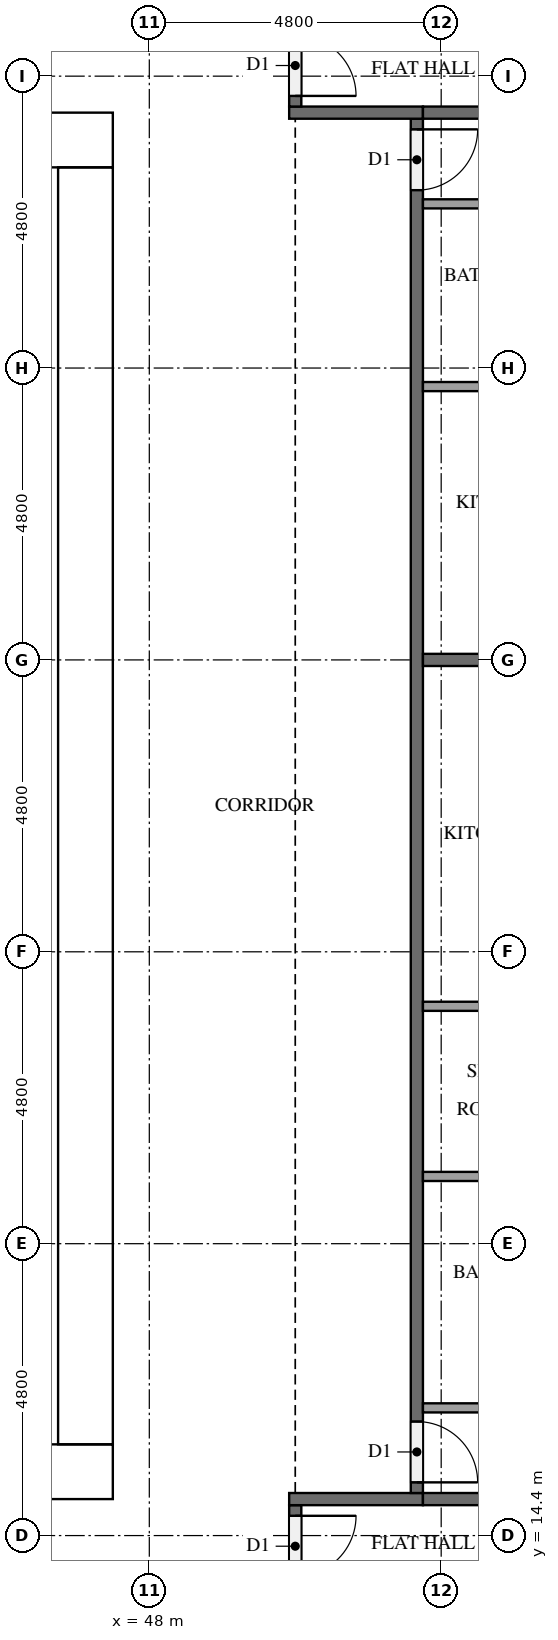
"""IFC4 building model, lengths in metres.
Left out: names, types, materials, properties, quantities, classifications, styles, units other than length and angle.
Written with IfcOpenShell. Run it as: python <this file> out.ifc"""

import sys

from ifc_helpers import new_model, si_unit, direction, frame, frame_2d, origin, place, context, subcontext, project, spatial, rectangle, extrude, element, fill, save


model = new_model("IFC4")
c1 = context("Model", 3, precision=1e-05, world=origin(), true_north=direction((0.0, 1.0)))
c2 = subcontext(c1, "Body", "Model", "MODEL_VIEW")
j1 = project(units=[si_unit("LENGTHUNIT", "METRE"), si_unit("PLANEANGLEUNIT", "RADIAN")], contexts=[c1])
p1 = place(None, origin())
s1 = spatial("IfcSite", under=j1, at=p1, CompositionType="ELEMENT")
p2 = place(p1, origin())
s2 = spatial("IfcBuilding", under=s1, at=p2, CompositionType="ELEMENT")
p3 = place(p2, frame((0.0, 0.0, 92.7)))
s3 = spatial("IfcBuildingStorey", under=s2, at=p3, CompositionType="ELEMENT", Elevation=92.7)
p4 = place(p3, frame((15.0, 15.45, 0.0), z_axis=(0.0, 0.0, 1.0), x_axis=(1.0, 0.0, 0.0)))
e1 = element("IfcWall", 1, at=p4, inside=s3, PredefinedType="SHEAR", context=c2, shape_type="SweptSolid", body=[
    extrude(rectangle(XDim=32.4, YDim=0.9, at=frame_2d((16.2, 0.0))), origin(), (0.0, 0.0, 1.0), 3.2),
])
p5 = place(p4, frame((15.3, 0.0, 0.0)))
e2 = element("IfcOpeningElement", 2, at=p5, cuts=e1, PredefinedType="OPENING", context=c2, shape_type="SweptSolid", body=[
    extrude(rectangle(XDim=1.8, YDim=2.1, at=frame_2d((0.9, 1.05))), frame((0.0, 0.46, 0.0), z_axis=(0.0, -1.0, 0.0), x_axis=(1.0, 0.0, 0.0)), (0.0, 0.0, 1.0), 0.92),
])
p6 = place(p3, frame((15.0, 37.35, 0.0), z_axis=(0.0, 0.0, 1.0), x_axis=(1.0, 0.0, 0.0)))
e3 = element("IfcWall", 3, at=p6, inside=s3, PredefinedType="SHEAR", context=c2, shape_type="SweptSolid", body=[
    extrude(rectangle(XDim=32.4, YDim=0.9, at=frame_2d((16.2, 0.0))), origin(), (0.0, 0.0, 1.0), 3.2),
])
p7 = place(p6, frame((15.3, 0.0, 0.0)))
e4 = element("IfcOpeningElement", 4, at=p7, cuts=e3, PredefinedType="OPENING", context=c2, shape_type="SweptSolid", body=[
    extrude(rectangle(XDim=1.8, YDim=2.1, at=frame_2d((0.9, 1.05))), frame((0.0, 0.46, 0.0), z_axis=(0.0, -1.0, 0.0), x_axis=(1.0, 0.0, 0.0)), (0.0, 0.0, 1.0), 0.92),
])
p8 = place(p6, frame((1.794, 0.0, 0.0)))
e5 = element("IfcOpeningElement", 5, at=p8, cuts=e3, PredefinedType="OPENING", context=c2, shape_type="SweptSolid", body=[
    extrude(rectangle(XDim=1.0, YDim=2.1, at=frame_2d((0.5, 1.05))), frame((0.0, 0.46, 0.0), z_axis=(0.0, -1.0, 0.0), x_axis=(1.0, 0.0, 0.0)), (0.0, 0.0, 1.0), 0.92),
])
p9 = place(p6, frame((5.331, 0.0, 0.0)))
e6 = element("IfcOpeningElement", 6, at=p9, cuts=e3, PredefinedType="OPENING", context=c2, shape_type="SweptSolid", body=[
    extrude(rectangle(XDim=1.0, YDim=2.1, at=frame_2d((0.5, 1.05))), frame((0.0, 0.46, 0.0), z_axis=(0.0, -1.0, 0.0), x_axis=(1.0, 0.0, 0.0)), (0.0, 0.0, 1.0), 0.92),
])
p10 = place(p3, frame((46.95, 15.9, 0.0), z_axis=(0.0, 0.0, 1.0), x_axis=(0.0, 1.0, 0.0)))
e7 = element("IfcWall", 7, at=p10, inside=s3, PredefinedType="SHEAR", context=c2, shape_type="SweptSolid", body=[
    extrude(rectangle(XDim=21.0, YDim=0.9, at=frame_2d((10.5, 0.0))), origin(), (0.0, 0.0, 1.0), 3.2),
])
p11 = place(p10, frame((10.2, 0.0, 0.0)))
e8 = element("IfcOpeningElement", 8, at=p11, cuts=e7, PredefinedType="OPENING", context=c2, shape_type="SweptSolid", body=[
    extrude(rectangle(XDim=1.2, YDim=2.1, at=frame_2d((0.6, 1.05))), frame((0.0, 0.46, 0.0), z_axis=(0.0, -1.0, 0.0), x_axis=(1.0, 0.0, 0.0)), (0.0, 0.0, 1.0), 0.92),
])
p12 = place(p3, frame((50.4, 14.9, 0.0), z_axis=(0.0, 0.0, 1.0), x_axis=(0.0, -1.0, 0.0)))
e9 = element("IfcWall", 9, at=p12, inside=s3, PredefinedType="PARTITIONING", context=c2, shape_type="SweptSolid", body=[
    extrude(rectangle(XDim=2.8, YDim=0.2, at=frame_2d((1.4, 0.0))), origin(), (0.0, 0.0, 1.0), 3.2),
])
p13 = place(p12, frame((0.175, 0.0, 0.0)))
e10 = element("IfcOpeningElement", 10, at=p13, cuts=e9, PredefinedType="OPENING", context=c2, shape_type="SweptSolid", body=[
    extrude(rectangle(XDim=1.0, YDim=2.1, at=frame_2d((0.5, 1.05))), frame((0.0, 0.11, 0.0), z_axis=(0.0, -1.0, 0.0), x_axis=(1.0, 0.0, 0.0)), (0.0, 0.0, 1.0), 0.22),
])
p14 = place(p3, frame((50.3, 15.0, 0.0), z_axis=(0.0, 0.0, 1.0), x_axis=(1.0, 0.0, 0.0)))
e11 = element("IfcWall", 11, at=p14, inside=s3, PredefinedType="PARTITIONING", context=c2, shape_type="SweptSolid", body=[
    extrude(rectangle(XDim=2.2, YDim=0.2, at=frame_2d((1.1, 0.0))), origin(), (0.0, 0.0, 1.0), 3.2),
])
p15 = place(p3, frame((52.4, 37.7, 0.0), z_axis=(0.0, 0.0, 1.0), x_axis=(0.0, -1.0, 0.0)))
e12 = element("IfcWall", 12, at=p15, inside=s3, PredefinedType="PARTITIONING", context=c2, shape_type="SweptSolid", body=[
    extrude(rectangle(XDim=22.6, YDim=0.2, at=frame_2d((11.3, 0.0))), origin(), (0.0, 0.0, 1.0), 3.2),
])
p16 = place(p15, frame((21.425, 0.0, 0.0)))
e13 = element("IfcOpeningElement", 13, at=p16, cuts=e12, PredefinedType="OPENING", context=c2, shape_type="SweptSolid", body=[
    extrude(rectangle(XDim=1.0, YDim=2.1, at=frame_2d((0.5, 1.05))), frame((0.0, 0.11, 0.0), z_axis=(0.0, -1.0, 0.0), x_axis=(1.0, 0.0, 0.0)), (0.0, 0.0, 1.0), 0.22),
])
p17 = place(p15, frame((0.175, 0.0, 0.0)))
e14 = element("IfcOpeningElement", 14, at=p17, cuts=e12, PredefinedType="OPENING", context=c2, shape_type="SweptSolid", body=[
    extrude(rectangle(XDim=1.0, YDim=2.1, at=frame_2d((0.5, 1.05))), frame((0.0, 0.11, 0.0), z_axis=(0.0, -1.0, 0.0), x_axis=(1.0, 0.0, 0.0)), (0.0, 0.0, 1.0), 0.22),
])
p18 = place(p3, frame((52.5, 37.8, 0.0), z_axis=(0.0, 0.0, 1.0), x_axis=(-1.0, 0.0, 0.0)))
e15 = element("IfcWall", 15, at=p18, inside=s3, PredefinedType="PARTITIONING", context=c2, shape_type="SweptSolid", body=[
    extrude(rectangle(XDim=2.2, YDim=0.2, at=frame_2d((1.1, 0.0))), origin(), (0.0, 0.0, 1.0), 3.2),
])
p19 = place(p3, frame((50.4, 40.7, 0.0), z_axis=(0.0, 0.0, 1.0), x_axis=(0.0, -1.0, 0.0)))
e16 = element("IfcWall", 16, at=p19, inside=s3, PredefinedType="PARTITIONING", context=c2, shape_type="SweptSolid", body=[
    extrude(rectangle(XDim=2.8, YDim=0.2, at=frame_2d((1.4, 0.0))), origin(), (0.0, 0.0, 1.0), 3.2),
])
p20 = place(p19, frame((1.625, 0.0, 0.0)))
e17 = element("IfcOpeningElement", 17, at=p20, cuts=e16, PredefinedType="OPENING", context=c2, shape_type="SweptSolid", body=[
    extrude(rectangle(XDim=1.0, YDim=2.1, at=frame_2d((0.5, 1.05))), frame((0.0, 0.11, 0.0), z_axis=(0.0, -1.0, 0.0), x_axis=(1.0, 0.0, 0.0)), (0.0, 0.0, 1.0), 0.22),
])
p21 = place(p3, frame((52.5, 15.0, 0.0), z_axis=(0.0, 0.0, 1.0), x_axis=(1.0, 0.0, 0.0)))
e18 = element("IfcWall", 18, at=p21, inside=s3, PredefinedType="PARTITIONING", context=c2, shape_type="SweptSolid", body=[
    extrude(rectangle(XDim=9.8, YDim=0.2, at=frame_2d((4.9, 0.0))), origin(), (0.0, 0.0, 1.0), 3.2),
])
for number, where, z_axis, x_axis in (
    (19, (52.5, 28.8, 0.0), (0.0, 0.0, 1.0), (1.0, 0.0, 0.0)),
    (20, (52.5, 37.8, 0.0), (0.0, 0.0, 1.0), (1.0, 0.0, 0.0)),
):
    element("IfcWall", number, at=place(p3, frame(where, z_axis=z_axis, x_axis=x_axis)), inside=s3, PredefinedType="PARTITIONING", context=c2, shape_type="SweptSolid", body=[
        extrude(rectangle(XDim=9.475, YDim=0.2, at=frame_2d((4.738, 0.0))), origin(), (0.0, 0.0, 1.0), 3.2),
    ])
for number, where, z_axis, x_axis in (
    (21, (52.5, 20.306, 0.0), (0.0, 0.0, 1.0), (1.0, 0.0, 0.0)),
    (22, (52.5, 23.104, 0.0), (0.0, 0.0, 1.0), (1.0, 0.0, 0.0)),
):
    element("IfcWall", number, at=place(p3, frame(where, z_axis=z_axis, x_axis=x_axis)), inside=s3, PredefinedType="PARTITIONING", context=c2, shape_type="SweptSolid", body=[
        extrude(rectangle(XDim=2.775, YDim=0.15, at=frame_2d((1.387, 0.0))), origin(), (0.0, 0.0, 1.0), 3.2),
    ])
p22 = place(p3, frame((52.5, 16.5, 0.0), z_axis=(0.0, 0.0, 1.0), x_axis=(1.0, 0.0, 0.0)))
e23 = element("IfcWall", 23, at=p22, inside=s3, PredefinedType="PARTITIONING", context=c2, shape_type="SweptSolid", body=[
    extrude(rectangle(XDim=2.925, YDim=0.15, at=frame_2d((1.462, 0.0))), origin(), (0.0, 0.0, 1.0), 3.2),
])
p23 = place(p3, frame((52.5, 33.295, 0.0), z_axis=(0.0, 0.0, 1.0), x_axis=(1.0, 0.0, 0.0)))
e24 = element("IfcWall", 24, at=p23, inside=s3, PredefinedType="PARTITIONING", context=c2, shape_type="SweptSolid", body=[
    extrude(rectangle(XDim=2.475, YDim=0.15, at=frame_2d((1.238, 0.0))), origin(), (0.0, 0.0, 1.0), 3.2),
])
p24 = place(p3, frame((52.5, 36.3, 0.0), z_axis=(0.0, 0.0, 1.0), x_axis=(1.0, 0.0, 0.0)))
e25 = element("IfcWall", 25, at=p24, inside=s3, PredefinedType="PARTITIONING", context=c2, shape_type="SweptSolid", body=[
    extrude(rectangle(XDim=2.625, YDim=0.15, at=frame_2d((1.312, 0.0))), origin(), (0.0, 0.0, 1.0), 3.2),
])
p25 = place(p11, origin())
e26 = element("IfcDoor", 26, at=p25, inside=s3, OperationType="SINGLE_SWING_LEFT", PredefinedType="DOOR", context=c2, shape_type="SweptSolid", body=[
    extrude(rectangle(XDim=1.2, YDim=2.1, at=frame_2d((0.6, 1.05))), frame((0.0, 0.025, 0.0), z_axis=(0.0, -1.0, 0.0), x_axis=(1.0, 0.0, 0.0)), (0.0, 0.0, 1.0), 0.05),
])
fill(e8, e26)
p26 = place(p13, origin())
e27 = element("IfcDoor", 27, at=p26, inside=s3, OperationType="SINGLE_SWING_LEFT", PredefinedType="DOOR", context=c2, shape_type="SweptSolid", body=[
    extrude(rectangle(XDim=1.0, YDim=2.1, at=frame_2d((0.5, 1.05))), frame((0.0, 0.025, 0.0), z_axis=(0.0, -1.0, 0.0), x_axis=(1.0, 0.0, 0.0)), (0.0, 0.0, 1.0), 0.05),
])
fill(e10, e27)
p27 = place(p16, origin())
e28 = element("IfcDoor", 28, at=p27, inside=s3, OperationType="SINGLE_SWING_RIGHT", PredefinedType="DOOR", context=c2, shape_type="SweptSolid", body=[
    extrude(rectangle(XDim=1.0, YDim=2.1, at=frame_2d((0.5, 1.05))), frame((0.0, 0.025, 0.0), z_axis=(0.0, -1.0, 0.0), x_axis=(1.0, 0.0, 0.0)), (0.0, 0.0, 1.0), 0.05),
])
fill(e13, e28)
p28 = place(p17, origin())
e29 = element("IfcDoor", 29, at=p28, inside=s3, OperationType="SINGLE_SWING_LEFT", PredefinedType="DOOR", context=c2, shape_type="SweptSolid", body=[
    extrude(rectangle(XDim=1.0, YDim=2.1, at=frame_2d((0.5, 1.05))), frame((0.0, 0.025, 0.0), z_axis=(0.0, -1.0, 0.0), x_axis=(1.0, 0.0, 0.0)), (0.0, 0.0, 1.0), 0.05),
])
fill(e14, e29)
p29 = place(p20, origin())
e30 = element("IfcDoor", 30, at=p29, inside=s3, OperationType="SINGLE_SWING_RIGHT", PredefinedType="DOOR", context=c2, shape_type="SweptSolid", body=[
    extrude(rectangle(XDim=1.0, YDim=2.1, at=frame_2d((0.5, 1.05))), frame((0.0, 0.025, 0.0), z_axis=(0.0, -1.0, 0.0), x_axis=(1.0, 0.0, 0.0)), (0.0, 0.0, 1.0), 0.05),
])
fill(e17, e30)
save(model, sys.argv[1])
